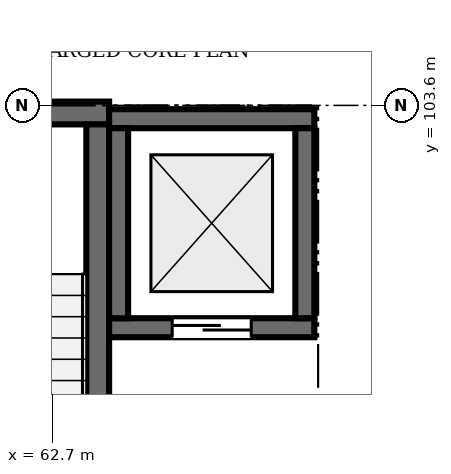
"""IFC4 building model, lengths in metres.
Left out: names, types, materials, properties, quantities, classifications, styles, units other than length and angle.
Written with IfcOpenShell. Run it as: python <this file> out.ifc"""

import sys

from ifc_helpers import new_model, si_unit, direction, frame, frame_2d, origin, place, context, subcontext, project, spatial, rectangle, extrude, element, fill, save


model = new_model("IFC4")
c1 = context("Model", 3, precision=1e-05, world=origin(), true_north=direction((0.0, 1.0)))
c2 = subcontext(c1, "Body", "Model", "MODEL_VIEW")
j1 = project(units=[si_unit("LENGTHUNIT", "METRE"), si_unit("PLANEANGLEUNIT", "RADIAN")], contexts=[c1])
p1 = place(None, origin())
s1 = spatial("IfcSite", under=j1, at=p1, CompositionType="ELEMENT")
p2 = place(p1, origin())
s2 = spatial("IfcBuilding", under=s1, at=p2, CompositionType="ELEMENT")
p3 = place(p2, origin())
s3 = spatial("IfcBuildingStorey", under=s2, at=p3, CompositionType="ELEMENT", Elevation=0.0)
p4 = place(p3, frame((59.75, 103.5, 0.0), z_axis=(0.0, 0.0, 1.0), x_axis=(1.0, 0.0, 0.0)))
e1 = element("IfcWall", 1, at=p4, inside=s3, PredefinedType="SHEAR", context=c2, shape_type="SweptSolid", body=[
    extrude(rectangle(XDim=3.7, YDim=0.3, at=frame_2d((1.85, 0.0))), origin(), (0.0, 0.0, 1.0), 5.18),
])
p5 = place(p3, frame((63.3, 95.45, 0.0), z_axis=(0.0, 0.0, 1.0), x_axis=(0.0, 1.0, 0.0)))
e2 = element("IfcWall", 2, at=p5, inside=s3, PredefinedType="SHEAR", context=c2, shape_type="SweptSolid", body=[
    extrude(rectangle(XDim=7.9, YDim=0.3, at=frame_2d((3.95, 0.0))), origin(), (0.0, 0.0, 1.0), 5.18),
])
p6 = place(p3, frame((63.45, 100.675, 0.0), z_axis=(0.0, 0.0, 1.0), x_axis=(1.0, 0.0, 0.0)))
e3 = element("IfcWall", 3, at=p6, inside=s3, PredefinedType="SHEAR", context=c2, shape_type="SweptSolid", body=[
    extrude(rectangle(XDim=2.7, YDim=0.25, at=frame_2d((1.35, 0.0))), origin(), (0.0, 0.0, 1.0), 5.18),
])
p7 = place(p6, frame((0.83, 0.0, 0.0)))
e4 = element("IfcOpeningElement", 4, at=p7, cuts=e3, PredefinedType="OPENING", context=c2, shape_type="SweptSolid", body=[
    extrude(rectangle(XDim=1.04, YDim=2.15, at=frame_2d((0.52, 1.075))), frame((0.0, 0.135, 0.0), z_axis=(0.0, -1.0, 0.0), x_axis=(1.0, 0.0, 0.0)), (0.0, 0.0, 1.0), 0.27),
])
p8 = place(p3, frame((63.45, 103.425, 0.0), z_axis=(0.0, 0.0, 1.0), x_axis=(1.0, 0.0, 0.0)))
e5 = element("IfcWall", 5, at=p8, inside=s3, PredefinedType="SHEAR", context=c2, shape_type="SweptSolid", body=[
    extrude(rectangle(XDim=2.7, YDim=0.25, at=frame_2d((1.35, 0.0))), origin(), (0.0, 0.0, 1.0), 5.18),
])
for number, where, z_axis, x_axis in (
    (6, (63.575, 100.8, 0.0), (0.0, 0.0, 1.0), (0.0, 1.0, 0.0)),
    (7, (66.025, 100.8, 0.0), (0.0, 0.0, 1.0), (0.0, 1.0, 0.0)),
):
    element("IfcWall", number, at=place(p3, frame(where, z_axis=z_axis, x_axis=x_axis)), inside=s3, PredefinedType="SHEAR", context=c2, shape_type="SweptSolid", body=[
        extrude(rectangle(XDim=2.5, YDim=0.25, at=frame_2d((1.25, 0.0))), origin(), (0.0, 0.0, 1.0), 5.18),
    ])
p9 = place(p7, origin())
e8 = element("IfcDoor", 8, at=p9, inside=s3, OperationType="SLIDING_TO_LEFT", PredefinedType="DOOR", context=c2, shape_type="SweptSolid", body=[
    extrude(rectangle(XDim=1.04, YDim=2.15, at=frame_2d((0.52, 1.075))), frame((0.0, 0.025, 0.0), z_axis=(0.0, -1.0, 0.0), x_axis=(1.0, 0.0, 0.0)), (0.0, 0.0, 1.0), 0.05),
])
fill(e4, e8)
save(model, sys.argv[1])
